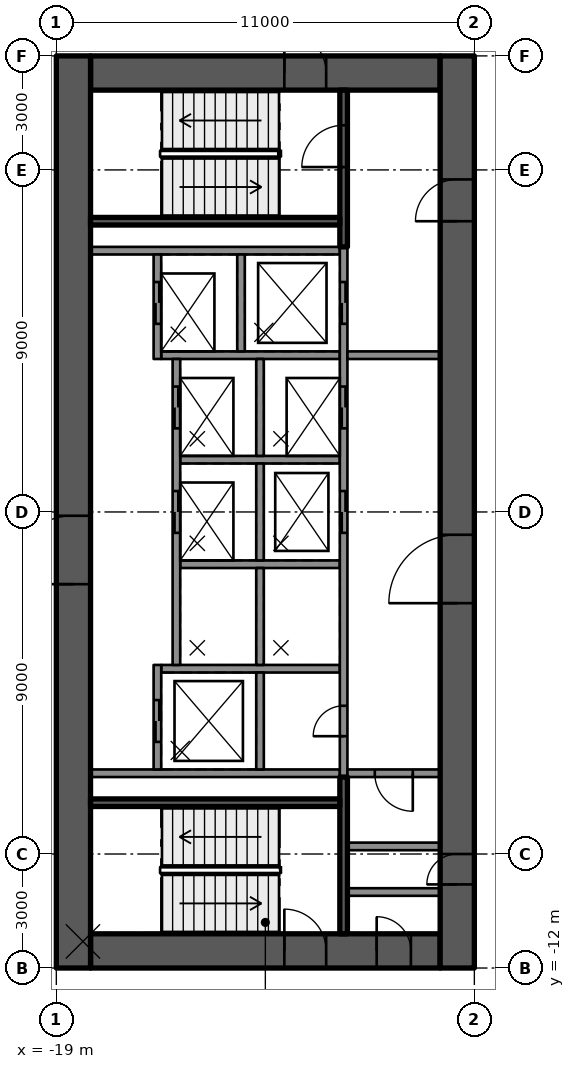
"""IFC4 building model, lengths in metres.
Left out: names, types, materials, properties, quantities, classifications, styles, units other than length and angle.
Written with IfcOpenShell. Run it as: python <this file> out.ifc"""

import sys

from ifc_helpers import new_model, si_unit, direction, frame, frame_2d, origin, place, context, subcontext, project, spatial, rectangle, extrude, element, fill, save


model = new_model("IFC4")
c1 = context("Model", 3, precision=1e-05, world=origin(), true_north=direction((0.0, 1.0)))
c2 = subcontext(c1, "Body", "Model", "MODEL_VIEW")
j1 = project(units=[si_unit("LENGTHUNIT", "METRE"), si_unit("PLANEANGLEUNIT", "RADIAN")], contexts=[c1])
p1 = place(None, origin())
s1 = spatial("IfcSite", under=j1, at=p1, CompositionType="ELEMENT")
p2 = place(p1, origin())
s2 = spatial("IfcBuilding", under=s1, at=p2, CompositionType="ELEMENT")
p3 = place(p2, frame((0.0, 0.0, 119.7)))
s3 = spatial("IfcBuildingStorey", under=s2, at=p3, CompositionType="ELEMENT", Elevation=119.7)
p4 = place(p3, frame((-18.1, 11.55, 0.0), z_axis=(0.0, 0.0, 1.0), x_axis=(1.0, 0.0, 0.0)))
e1 = element("IfcWall", 1, at=p4, inside=s3, PredefinedType="SHEAR", context=c2, shape_type="SweptSolid", body=[
    extrude(rectangle(XDim=9.2, YDim=0.9, at=frame_2d((4.6, 0.0))), origin(), (0.0, 0.0, 1.0), 4.0),
])
p5 = place(p4, frame((5.1, 0.0, 0.0)))
e2 = element("IfcOpeningElement", 2, at=p5, cuts=e1, PredefinedType="OPENING", context=c2, shape_type="SweptSolid", body=[
    extrude(rectangle(XDim=1.1, YDim=2.1, at=frame_2d((0.55, 1.05))), frame((0.0, 0.46, 0.0), z_axis=(0.0, -1.0, 0.0), x_axis=(1.0, 0.0, 0.0)), (0.0, 0.0, 1.0), 0.92),
])
p6 = place(p3, frame((-18.1, -11.55, 0.0), z_axis=(0.0, 0.0, 1.0), x_axis=(1.0, 0.0, 0.0)))
e3 = element("IfcWall", 3, at=p6, inside=s3, PredefinedType="SHEAR", context=c2, shape_type="SweptSolid", body=[
    extrude(rectangle(XDim=9.2, YDim=0.9, at=frame_2d((4.6, 0.0))), origin(), (0.0, 0.0, 1.0), 4.0),
])
p7 = place(p6, frame((5.1, 0.0, 0.0)))
e4 = element("IfcOpeningElement", 4, at=p7, cuts=e3, PredefinedType="OPENING", context=c2, shape_type="SweptSolid", body=[
    extrude(rectangle(XDim=1.1, YDim=2.1, at=frame_2d((0.55, 1.05))), frame((0.0, 0.46, 0.0), z_axis=(0.0, -1.0, 0.0), x_axis=(1.0, 0.0, 0.0)), (0.0, 0.0, 1.0), 0.92),
])
p8 = place(p6, frame((7.53, 0.0, 0.0)))
e5 = element("IfcOpeningElement", 5, at=p8, cuts=e3, PredefinedType="OPENING", context=c2, shape_type="SweptSolid", body=[
    extrude(rectangle(XDim=0.9, YDim=2.1, at=frame_2d((0.45, 1.05))), frame((0.0, 0.46, 0.0), z_axis=(0.0, -1.0, 0.0), x_axis=(1.0, 0.0, 0.0)), (0.0, 0.0, 1.0), 0.92),
])
p9 = place(p3, frame((-18.55, -12.0, 0.0), z_axis=(0.0, 0.0, 1.0), x_axis=(0.0, 1.0, 0.0)))
e6 = element("IfcWall", 6, at=p9, inside=s3, PredefinedType="SHEAR", context=c2, shape_type="SweptSolid", body=[
    extrude(rectangle(XDim=24.0, YDim=0.9, at=frame_2d((12.0, 0.0))), origin(), (0.0, 0.0, 1.0), 4.0),
])
p10 = place(p9, frame((10.1, 0.0, 0.0)))
e7 = element("IfcOpeningElement", 7, at=p10, cuts=e6, PredefinedType="OPENING", context=c2, shape_type="SweptSolid", body=[
    extrude(rectangle(XDim=1.8, YDim=2.1, at=frame_2d((0.9, 1.05))), frame((0.0, 0.46, 0.0), z_axis=(0.0, -1.0, 0.0), x_axis=(1.0, 0.0, 0.0)), (0.0, 0.0, 1.0), 0.92),
])
p11 = place(p3, frame((-8.45, -12.0, 0.0), z_axis=(0.0, 0.0, 1.0), x_axis=(0.0, 1.0, 0.0)))
e8 = element("IfcWall", 8, at=p11, inside=s3, PredefinedType="SHEAR", context=c2, shape_type="SweptSolid", body=[
    extrude(rectangle(XDim=24.0, YDim=0.9, at=frame_2d((12.0, 0.0))), origin(), (0.0, 0.0, 1.0), 4.0),
])
p12 = place(p11, frame((9.6, 0.0, 0.0)))
e9 = element("IfcOpeningElement", 9, at=p12, cuts=e8, PredefinedType="OPENING", context=c2, shape_type="SweptSolid", body=[
    extrude(rectangle(XDim=1.8, YDim=2.1, at=frame_2d((0.9, 1.05))), frame((0.0, 0.46, 0.0), z_axis=(0.0, -1.0, 0.0), x_axis=(1.0, 0.0, 0.0)), (0.0, 0.0, 1.0), 0.92),
])
p13 = place(p11, frame((19.65, 0.0, 0.0)))
e10 = element("IfcOpeningElement", 10, at=p13, cuts=e8, PredefinedType="OPENING", context=c2, shape_type="SweptSolid", body=[
    extrude(rectangle(XDim=1.1, YDim=2.1, at=frame_2d((0.55, 1.05))), frame((0.0, 0.46, 0.0), z_axis=(0.0, -1.0, 0.0), x_axis=(1.0, 0.0, 0.0)), (0.0, 0.0, 1.0), 0.92),
])
p14 = place(p11, frame((2.2, 0.0, 0.0)))
e11 = element("IfcOpeningElement", 11, at=p14, cuts=e8, PredefinedType="OPENING", context=c2, shape_type="SweptSolid", body=[
    extrude(rectangle(XDim=0.8, YDim=2.1, at=frame_2d((0.4, 1.05))), frame((0.0, 0.46, 0.0), z_axis=(0.0, -1.0, 0.0), x_axis=(1.0, 0.0, 0.0)), (0.0, 0.0, 1.0), 0.92),
])
for number, where, z_axis, x_axis in (
    (12, (-11.54, 6.875, 0.0), (0.0, 0.0, 1.0), (-1.0, 0.0, 0.0)),
    (13, (-11.54, -6.875, 0.0), (0.0, 0.0, 1.0), (-1.0, 0.0, 0.0)),
):
    element("IfcWall", number, at=place(p3, frame(where, z_axis=z_axis, x_axis=x_axis)), inside=s3, PredefinedType="SOLIDWALL", context=c2, shape_type="SweptSolid", body=[
        extrude(rectangle(XDim=6.56, YDim=0.2, at=frame_2d((3.28, 0.0))), origin(), (0.0, 0.0, 1.0), 3.59),
    ])
p15 = place(p3, frame((-11.54, -4.125, 0.0), z_axis=(0.0, 0.0, 1.0), x_axis=(-1.0, 0.0, 0.0)))
e14 = element("IfcWall", 14, at=p15, inside=s3, PredefinedType="SOLIDWALL", context=c2, shape_type="SweptSolid", body=[
    extrude(rectangle(XDim=4.7, YDim=0.2, at=frame_2d((2.35, 0.0))), origin(), (0.0, 0.0, 1.0), 3.59),
])
for number, where, z_axis, x_axis in (
    (15, (-11.54, -1.375, 0.0), (0.0, 0.0, 1.0), (-1.0, 0.0, 0.0)),
    (16, (-11.54, 1.375, 0.0), (0.0, 0.0, 1.0), (-1.0, 0.0, 0.0)),
):
    element("IfcWall", number, at=place(p3, frame(where, z_axis=z_axis, x_axis=x_axis)), inside=s3, PredefinedType="SOLIDWALL", context=c2, shape_type="SweptSolid", body=[
        extrude(rectangle(XDim=4.2, YDim=0.2, at=frame_2d((2.1, 0.0))), origin(), (0.0, 0.0, 1.0), 3.59),
    ])
p16 = place(p3, frame((-11.54, 4.125, 0.0), z_axis=(0.0, 0.0, 1.0), x_axis=(-1.0, 0.0, 0.0)))
e17 = element("IfcWall", 17, at=p16, inside=s3, PredefinedType="SOLIDWALL", context=c2, shape_type="SweptSolid", body=[
    extrude(rectangle(XDim=4.7, YDim=0.2, at=frame_2d((2.35, 0.0))), origin(), (0.0, 0.0, 1.0), 3.59),
])
p17 = place(p3, frame((-11.44, -6.975, 0.0), z_axis=(0.0, 0.0, 1.0), x_axis=(0.0, 1.0, 0.0)))
e18 = element("IfcWall", 18, at=p17, inside=s3, PredefinedType="SOLIDWALL", context=c2, shape_type="SweptSolid", body=[
    extrude(rectangle(XDim=13.95, YDim=0.2, at=frame_2d((6.975, 0.0))), origin(), (0.0, 0.0, 1.0), 3.59),
])
p18 = place(p17, frame((6.425, 0.0, 0.0)))
e19 = element("IfcOpeningElement", 19, at=p18, cuts=e18, PredefinedType="OPENING", context=c2, shape_type="SweptSolid", body=[
    extrude(rectangle(XDim=1.1, YDim=2.1, at=frame_2d((0.55, 1.05))), frame((0.0, 0.11, 0.0), z_axis=(0.0, -1.0, 0.0), x_axis=(1.0, 0.0, 0.0)), (0.0, 0.0, 1.0), 0.22),
])
p19 = place(p17, frame((9.175, 0.0, 0.0)))
e20 = element("IfcOpeningElement", 20, at=p19, cuts=e18, PredefinedType="OPENING", context=c2, shape_type="SweptSolid", body=[
    extrude(rectangle(XDim=1.1, YDim=2.1, at=frame_2d((0.55, 1.05))), frame((0.0, 0.11, 0.0), z_axis=(0.0, -1.0, 0.0), x_axis=(1.0, 0.0, 0.0)), (0.0, 0.0, 1.0), 0.22),
])
p20 = place(p17, frame((11.925, 0.0, 0.0)))
e21 = element("IfcOpeningElement", 21, at=p20, cuts=e18, PredefinedType="OPENING", context=c2, shape_type="SweptSolid", body=[
    extrude(rectangle(XDim=1.1, YDim=2.1, at=frame_2d((0.55, 1.05))), frame((0.0, 0.11, 0.0), z_axis=(0.0, -1.0, 0.0), x_axis=(1.0, 0.0, 0.0)), (0.0, 0.0, 1.0), 0.22),
])
p21 = place(p17, frame((1.075, 0.0, 0.0)))
e22 = element("IfcOpeningElement", 22, at=p21, cuts=e18, PredefinedType="OPENING", context=c2, shape_type="SweptSolid", body=[
    extrude(rectangle(XDim=0.8, YDim=2.1, at=frame_2d((0.4, 1.05))), frame((0.0, 0.11, 0.0), z_axis=(0.0, -1.0, 0.0), x_axis=(1.0, 0.0, 0.0)), (0.0, 0.0, 1.0), 0.22),
])
for number, where, z_axis, x_axis in (
    (23, (-13.64, -6.775, 0.0), (0.0, 0.0, 1.0), (0.0, 1.0, 0.0)),
    (24, (-13.64, -4.025, 0.0), (0.0, 0.0, 1.0), (0.0, 1.0, 0.0)),
    (25, (-13.64, -1.275, 0.0), (0.0, 0.0, 1.0), (0.0, 1.0, 0.0)),
    (26, (-13.64, 1.475, 0.0), (0.0, 0.0, 1.0), (0.0, 1.0, 0.0)),
    (27, (-14.14, 4.225, 0.0), (0.0, 0.0, 1.0), (0.0, 1.0, 0.0)),
):
    element("IfcWall", number, at=place(p3, frame(where, z_axis=z_axis, x_axis=x_axis)), inside=s3, PredefinedType="SOLIDWALL", context=c2, shape_type="SweptSolid", body=[
        extrude(rectangle(XDim=2.55, YDim=0.2, at=frame_2d((1.275, 0.0))), origin(), (0.0, 0.0, 1.0), 3.59),
    ])
p22 = place(p3, frame((-16.34, -6.775, 0.0), z_axis=(0.0, 0.0, 1.0), x_axis=(0.0, 1.0, 0.0)))
e28 = element("IfcWall", 28, at=p22, inside=s3, PredefinedType="SOLIDWALL", context=c2, shape_type="SweptSolid", body=[
    extrude(rectangle(XDim=2.75, YDim=0.2, at=frame_2d((1.375, 0.0))), origin(), (0.0, 0.0, 1.0), 3.59),
])
p23 = place(p22, frame((0.725, 0.0, 0.0)))
e29 = element("IfcOpeningElement", 29, at=p23, cuts=e28, PredefinedType="OPENING", context=c2, shape_type="SweptSolid", body=[
    extrude(rectangle(XDim=1.1, YDim=2.1, at=frame_2d((0.55, 1.05))), frame((0.0, 0.11, 0.0), z_axis=(0.0, -1.0, 0.0), x_axis=(1.0, 0.0, 0.0)), (0.0, 0.0, 1.0), 0.22),
])
p24 = place(p3, frame((-15.84, -4.025, 0.0), z_axis=(0.0, 0.0, 1.0), x_axis=(0.0, 1.0, 0.0)))
e30 = element("IfcWall", 30, at=p24, inside=s3, PredefinedType="SOLIDWALL", context=c2, shape_type="SweptSolid", body=[
    extrude(rectangle(XDim=8.05, YDim=0.2, at=frame_2d((4.025, 0.0))), origin(), (0.0, 0.0, 1.0), 3.59),
])
p25 = place(p24, frame((3.475, 0.0, 0.0)))
e31 = element("IfcOpeningElement", 31, at=p25, cuts=e30, PredefinedType="OPENING", context=c2, shape_type="SweptSolid", body=[
    extrude(rectangle(XDim=1.1, YDim=2.1, at=frame_2d((0.55, 1.05))), frame((0.0, 0.11, 0.0), z_axis=(0.0, -1.0, 0.0), x_axis=(1.0, 0.0, 0.0)), (0.0, 0.0, 1.0), 0.22),
])
p26 = place(p24, frame((6.225, 0.0, 0.0)))
e32 = element("IfcOpeningElement", 32, at=p26, cuts=e30, PredefinedType="OPENING", context=c2, shape_type="SweptSolid", body=[
    extrude(rectangle(XDim=1.1, YDim=2.1, at=frame_2d((0.55, 1.05))), frame((0.0, 0.11, 0.0), z_axis=(0.0, -1.0, 0.0), x_axis=(1.0, 0.0, 0.0)), (0.0, 0.0, 1.0), 0.22),
])
p27 = place(p3, frame((-16.34, 4.025, 0.0), z_axis=(0.0, 0.0, 1.0), x_axis=(0.0, 1.0, 0.0)))
e33 = element("IfcWall", 33, at=p27, inside=s3, PredefinedType="SOLIDWALL", context=c2, shape_type="SweptSolid", body=[
    extrude(rectangle(XDim=2.75, YDim=0.2, at=frame_2d((1.375, 0.0))), origin(), (0.0, 0.0, 1.0), 3.59),
])
p28 = place(p27, frame((0.925, 0.0, 0.0)))
e34 = element("IfcOpeningElement", 34, at=p28, cuts=e33, PredefinedType="OPENING", context=c2, shape_type="SweptSolid", body=[
    extrude(rectangle(XDim=1.1, YDim=2.1, at=frame_2d((0.55, 1.05))), frame((0.0, 0.11, 0.0), z_axis=(0.0, -1.0, 0.0), x_axis=(1.0, 0.0, 0.0)), (0.0, 0.0, 1.0), 0.22),
])
p29 = place(p3, frame((-11.44, 6.975, 0.0), z_axis=(0.0, 0.0, 1.0), x_axis=(0.0, 1.0, 0.0)))
e35 = element("IfcWall", 35, at=p29, inside=s3, PredefinedType="SOLIDWALL", context=c2, shape_type="SweptSolid", body=[
    extrude(rectangle(XDim=4.125, YDim=0.2, at=frame_2d((2.062, 0.0))), origin(), (0.0, 0.0, 1.0), 3.59),
])
p30 = place(p29, frame((2.1, 0.0, 0.0)))
e36 = element("IfcOpeningElement", 36, at=p30, cuts=e35, PredefinedType="OPENING", context=c2, shape_type="SweptSolid", body=[
    extrude(rectangle(XDim=1.1, YDim=2.1, at=frame_2d((0.55, 1.05))), frame((0.0, 0.11, 0.0), z_axis=(0.0, -1.0, 0.0), x_axis=(1.0, 0.0, 0.0)), (0.0, 0.0, 1.0), 0.22),
])
p31 = place(p3, frame((-11.54, 7.65, 0.0), z_axis=(0.0, 0.0, 1.0), x_axis=(-1.0, 0.0, 0.0)))
e37 = element("IfcWall", 37, at=p31, inside=s3, PredefinedType="SOLIDWALL", context=c2, shape_type="SweptSolid", body=[
    extrude(rectangle(XDim=6.56, YDim=0.2, at=frame_2d((3.28, 0.0))), origin(), (0.0, 0.0, 1.0), 3.59),
])
p32 = place(p3, frame((-11.44, -11.1, 0.0), z_axis=(0.0, 0.0, 1.0), x_axis=(0.0, 1.0, 0.0)))
e38 = element("IfcWall", 38, at=p32, inside=s3, PredefinedType="SOLIDWALL", context=c2, shape_type="SweptSolid", body=[
    extrude(rectangle(XDim=4.125, YDim=0.2, at=frame_2d((2.062, 0.0))), origin(), (0.0, 0.0, 1.0), 3.59),
])
p33 = place(p3, frame((-11.54, -7.65, 0.0), z_axis=(0.0, 0.0, 1.0), x_axis=(-1.0, 0.0, 0.0)))
e39 = element("IfcWall", 39, at=p33, inside=s3, PredefinedType="SOLIDWALL", context=c2, shape_type="SweptSolid", body=[
    extrude(rectangle(XDim=6.56, YDim=0.2, at=frame_2d((3.28, 0.0))), origin(), (0.0, 0.0, 1.0), 3.59),
])
p34 = place(p3, frame((-8.9, 4.125, 0.0), z_axis=(0.0, 0.0, 1.0), x_axis=(-1.0, 0.0, 0.0)))
e40 = element("IfcWall", 40, at=p34, inside=s3, PredefinedType="PARTITIONING", context=c2, shape_type="SweptSolid", body=[
    extrude(rectangle(XDim=2.44, YDim=0.2, at=frame_2d((1.22, 0.0))), origin(), (0.0, 0.0, 1.0), 3.59),
])
p35 = place(p3, frame((-8.9, -6.875, 0.0), z_axis=(0.0, 0.0, 1.0), x_axis=(-1.0, 0.0, 0.0)))
e41 = element("IfcWall", 41, at=p35, inside=s3, PredefinedType="PARTITIONING", context=c2, shape_type="SweptSolid", body=[
    extrude(rectangle(XDim=2.44, YDim=0.2, at=frame_2d((1.22, 0.0))), origin(), (0.0, 0.0, 1.0), 3.59),
])
p36 = place(p35, frame((0.72, 0.0, 0.0)))
e42 = element("IfcOpeningElement", 42, at=p36, cuts=e41, PredefinedType="OPENING", context=c2, shape_type="SweptSolid", body=[
    extrude(rectangle(XDim=1.0, YDim=2.1, at=frame_2d((0.5, 1.05))), frame((0.0, 0.11, 0.0), z_axis=(0.0, -1.0, 0.0), x_axis=(1.0, 0.0, 0.0)), (0.0, 0.0, 1.0), 0.22),
])
for number, where, z_axis, x_axis in (
    (43, (-8.9, -10.0, 0.0), (0.0, 0.0, 1.0), (-1.0, 0.0, 0.0)),
    (44, (-8.9, -8.8, 0.0), (0.0, 0.0, 1.0), (-1.0, 0.0, 0.0)),
):
    element("IfcWall", number, at=place(p3, frame(where, z_axis=z_axis, x_axis=x_axis)), inside=s3, PredefinedType="PARTITIONING", context=c2, shape_type="SweptSolid", body=[
        extrude(rectangle(XDim=2.44, YDim=0.2, at=frame_2d((1.22, 0.0))), origin(), (0.0, 0.0, 1.0), 3.59),
    ])
p37 = place(p23, origin())
e45 = element("IfcDoor", 45, at=p37, inside=s3, OperationType="DOUBLE_DOOR_SLIDING", PredefinedType="DOOR", context=c2, shape_type="SweptSolid", body=[
    extrude(rectangle(XDim=1.1, YDim=2.1, at=frame_2d((0.55, 1.05))), frame((0.0, 0.025, 0.0), z_axis=(0.0, -1.0, 0.0), x_axis=(1.0, 0.0, 0.0)), (0.0, 0.0, 1.0), 0.05),
])
fill(e29, e45)
p38 = place(p18, origin())
e46 = element("IfcDoor", 46, at=p38, inside=s3, OperationType="DOUBLE_DOOR_SLIDING", PredefinedType="DOOR", context=c2, shape_type="SweptSolid", body=[
    extrude(rectangle(XDim=1.1, YDim=2.1, at=frame_2d((0.55, 1.05))), frame((0.0, 0.025, 0.0), z_axis=(0.0, -1.0, 0.0), x_axis=(1.0, 0.0, 0.0)), (0.0, 0.0, 1.0), 0.05),
])
fill(e19, e46)
p39 = place(p25, origin())
e47 = element("IfcDoor", 47, at=p39, inside=s3, OperationType="DOUBLE_DOOR_SLIDING", PredefinedType="DOOR", context=c2, shape_type="SweptSolid", body=[
    extrude(rectangle(XDim=1.1, YDim=2.1, at=frame_2d((0.55, 1.05))), frame((0.0, 0.025, 0.0), z_axis=(0.0, -1.0, 0.0), x_axis=(1.0, 0.0, 0.0)), (0.0, 0.0, 1.0), 0.05),
])
fill(e31, e47)
p40 = place(p19, origin())
e48 = element("IfcDoor", 48, at=p40, inside=s3, OperationType="DOUBLE_DOOR_SLIDING", PredefinedType="DOOR", context=c2, shape_type="SweptSolid", body=[
    extrude(rectangle(XDim=1.1, YDim=2.1, at=frame_2d((0.55, 1.05))), frame((0.0, 0.025, 0.0), z_axis=(0.0, -1.0, 0.0), x_axis=(1.0, 0.0, 0.0)), (0.0, 0.0, 1.0), 0.05),
])
fill(e20, e48)
p41 = place(p26, origin())
e49 = element("IfcDoor", 49, at=p41, inside=s3, OperationType="DOUBLE_DOOR_SLIDING", PredefinedType="DOOR", context=c2, shape_type="SweptSolid", body=[
    extrude(rectangle(XDim=1.1, YDim=2.1, at=frame_2d((0.55, 1.05))), frame((0.0, 0.025, 0.0), z_axis=(0.0, -1.0, 0.0), x_axis=(1.0, 0.0, 0.0)), (0.0, 0.0, 1.0), 0.05),
])
fill(e32, e49)
p42 = place(p20, origin())
e50 = element("IfcDoor", 50, at=p42, inside=s3, OperationType="DOUBLE_DOOR_SLIDING", PredefinedType="DOOR", context=c2, shape_type="SweptSolid", body=[
    extrude(rectangle(XDim=1.1, YDim=2.1, at=frame_2d((0.55, 1.05))), frame((0.0, 0.025, 0.0), z_axis=(0.0, -1.0, 0.0), x_axis=(1.0, 0.0, 0.0)), (0.0, 0.0, 1.0), 0.05),
])
fill(e21, e50)
p43 = place(p28, origin())
e51 = element("IfcDoor", 51, at=p43, inside=s3, OperationType="DOUBLE_DOOR_SLIDING", PredefinedType="DOOR", context=c2, shape_type="SweptSolid", body=[
    extrude(rectangle(XDim=1.1, YDim=2.1, at=frame_2d((0.55, 1.05))), frame((0.0, 0.025, 0.0), z_axis=(0.0, -1.0, 0.0), x_axis=(1.0, 0.0, 0.0)), (0.0, 0.0, 1.0), 0.05),
])
fill(e34, e51)
p44 = place(p21, origin())
e52 = element("IfcDoor", 52, at=p44, inside=s3, OperationType="SINGLE_SWING_LEFT", PredefinedType="DOOR", context=c2, shape_type="SweptSolid", body=[
    extrude(rectangle(XDim=0.8, YDim=2.1, at=frame_2d((0.4, 1.05))), frame((0.0, 0.025, 0.0), z_axis=(0.0, -1.0, 0.0), x_axis=(1.0, 0.0, 0.0)), (0.0, 0.0, 1.0), 0.05),
])
fill(e22, e52)
p45 = place(p12, origin())
e53 = element("IfcDoor", 53, at=p45, inside=s3, OperationType="SINGLE_SWING_LEFT", PredefinedType="DOOR", context=c2, shape_type="SweptSolid", body=[
    extrude(rectangle(XDim=1.8, YDim=2.1, at=frame_2d((0.9, 1.05))), frame((0.0, 0.025, 0.0), z_axis=(0.0, -1.0, 0.0), x_axis=(1.0, 0.0, 0.0)), (0.0, 0.0, 1.0), 0.05),
])
fill(e9, e53)
p46 = place(p10, origin())
e54 = element("IfcDoor", 54, at=p46, inside=s3, OperationType="SINGLE_SWING_LEFT", PredefinedType="DOOR", context=c2, shape_type="SweptSolid", body=[
    extrude(rectangle(XDim=1.8, YDim=2.1, at=frame_2d((0.9, 1.05))), frame((0.0, 0.025, 0.0), z_axis=(0.0, -1.0, 0.0), x_axis=(1.0, 0.0, 0.0)), (0.0, 0.0, 1.0), 0.05),
])
fill(e7, e54)
p47 = place(p13, origin())
e55 = element("IfcDoor", 55, at=p47, inside=s3, OperationType="SINGLE_SWING_RIGHT", PredefinedType="DOOR", context=c2, shape_type="SweptSolid", body=[
    extrude(rectangle(XDim=1.1, YDim=2.1, at=frame_2d((0.55, 1.05))), frame((0.0, 0.025, 0.0), z_axis=(0.0, -1.0, 0.0), x_axis=(1.0, 0.0, 0.0)), (0.0, 0.0, 1.0), 0.05),
])
fill(e10, e55)
p48 = place(p5, origin())
e56 = element("IfcDoor", 56, at=p48, inside=s3, OperationType="SINGLE_SWING_RIGHT", PredefinedType="DOOR", context=c2, shape_type="SweptSolid", body=[
    extrude(rectangle(XDim=1.1, YDim=2.1, at=frame_2d((0.55, 1.05))), frame((0.0, 0.025, 0.0), z_axis=(0.0, -1.0, 0.0), x_axis=(1.0, 0.0, 0.0)), (0.0, 0.0, 1.0), 0.05),
])
fill(e2, e56)
p49 = place(p7, origin())
e57 = element("IfcDoor", 57, at=p49, inside=s3, OperationType="SINGLE_SWING_RIGHT", PredefinedType="DOOR", context=c2, shape_type="SweptSolid", body=[
    extrude(rectangle(XDim=1.1, YDim=2.1, at=frame_2d((0.55, 1.05))), frame((0.0, 0.025, 0.0), z_axis=(0.0, -1.0, 0.0), x_axis=(1.0, 0.0, 0.0)), (0.0, 0.0, 1.0), 0.05),
])
fill(e4, e57)
p50 = place(p30, origin())
e58 = element("IfcDoor", 58, at=p50, inside=s3, OperationType="SINGLE_SWING_RIGHT", PredefinedType="DOOR", context=c2, shape_type="SweptSolid", body=[
    extrude(rectangle(XDim=1.1, YDim=2.1, at=frame_2d((0.55, 1.05))), frame((0.0, 0.025, 0.0), z_axis=(0.0, -1.0, 0.0), x_axis=(1.0, 0.0, 0.0)), (0.0, 0.0, 1.0), 0.05),
])
fill(e36, e58)
p51 = place(p8, origin())
e59 = element("IfcDoor", 59, at=p51, inside=s3, OperationType="SINGLE_SWING_RIGHT", PredefinedType="DOOR", context=c2, shape_type="SweptSolid", body=[
    extrude(rectangle(XDim=0.9, YDim=2.1, at=frame_2d((0.45, 1.05))), frame((0.0, 0.025, 0.0), z_axis=(0.0, -1.0, 0.0), x_axis=(1.0, 0.0, 0.0)), (0.0, 0.0, 1.0), 0.05),
])
fill(e5, e59)
p52 = place(p14, origin())
e60 = element("IfcDoor", 60, at=p52, inside=s3, OperationType="SINGLE_SWING_LEFT", PredefinedType="DOOR", context=c2, shape_type="SweptSolid", body=[
    extrude(rectangle(XDim=0.8, YDim=2.1, at=frame_2d((0.4, 1.05))), frame((0.0, 0.025, 0.0), z_axis=(0.0, -1.0, 0.0), x_axis=(1.0, 0.0, 0.0)), (0.0, 0.0, 1.0), 0.05),
])
fill(e11, e60)
p53 = place(p36, origin())
e61 = element("IfcDoor", 61, at=p53, inside=s3, OperationType="SINGLE_SWING_RIGHT", PredefinedType="DOOR", context=c2, shape_type="SweptSolid", body=[
    extrude(rectangle(XDim=1.0, YDim=2.1, at=frame_2d((0.5, 1.05))), frame((0.0, 0.025, 0.0), z_axis=(0.0, -1.0, 0.0), x_axis=(1.0, 0.0, 0.0)), (0.0, 0.0, 1.0), 0.05),
])
fill(e42, e61)
save(model, sys.argv[1])
